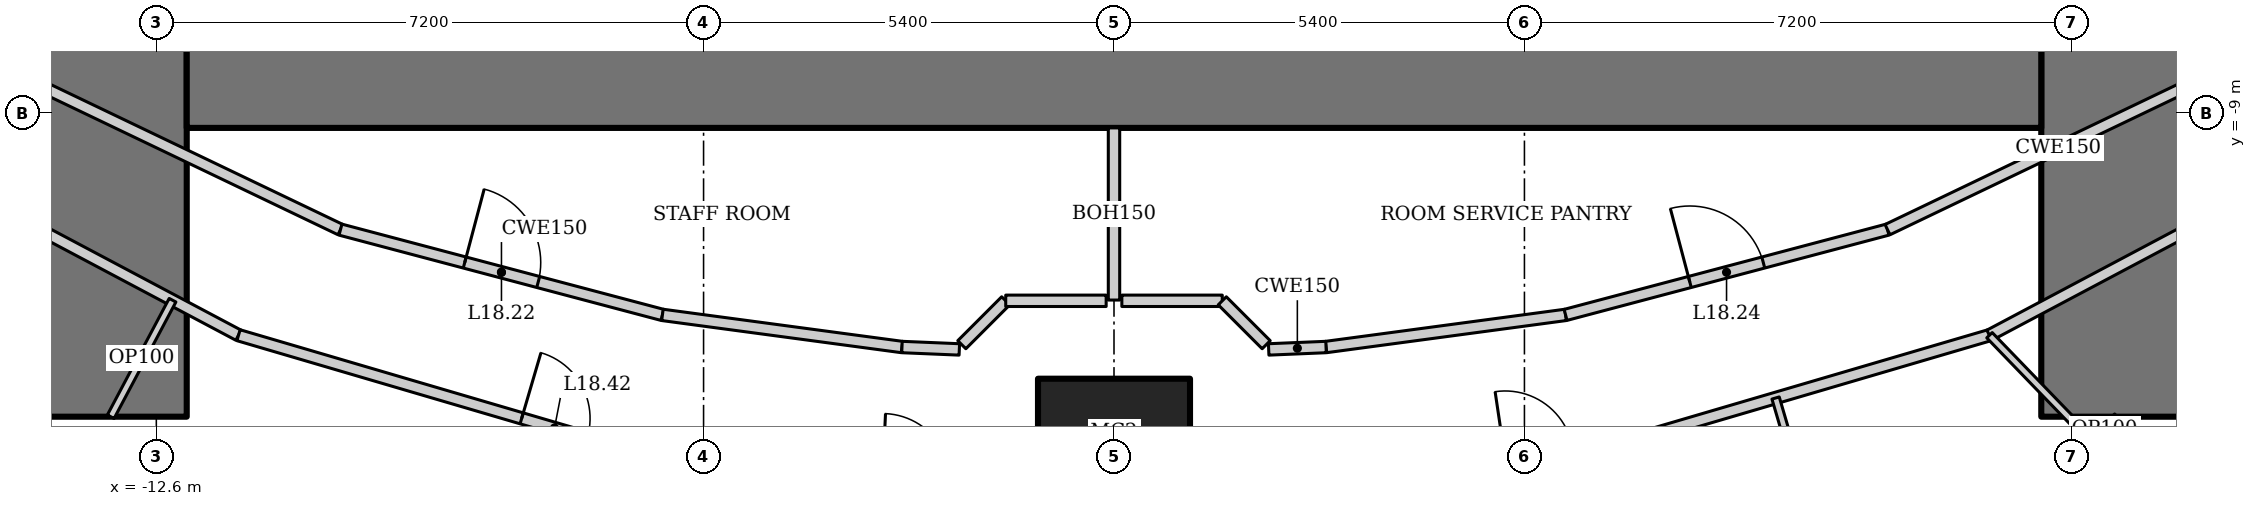
"""IFC4 building model, lengths in metres.
Left out: names, types, materials, properties, quantities, classifications, styles, units other than length and angle.
Written with IfcOpenShell. Run it as: python <this file> out.ifc"""

import sys

from ifc_helpers import new_model, si_unit, direction, frame, frame_2d, origin, origin_2d, place, context, subcontext, project, spatial, rectangle, hollow_rectangle, extrude, element, fill, save


model = new_model("IFC4")
c1 = context("Model", 3, precision=1e-05, world=origin(), true_north=direction((0.0, 1.0)))
c2 = subcontext(c1, "Body", "Model", "MODEL_VIEW")
j1 = project(units=[si_unit("LENGTHUNIT", "METRE"), si_unit("PLANEANGLEUNIT", "RADIAN")], contexts=[c1])
p1 = place(None, origin())
s1 = spatial("IfcSite", under=j1, at=p1, CompositionType="ELEMENT")
p2 = place(p1, origin())
s2 = spatial("IfcBuilding", under=s1, at=p2, CompositionType="ELEMENT")
p3 = place(p2, frame((0.0, 0.0, 80.2)))
s3 = spatial("IfcBuildingStorey", under=s2, at=p3, CompositionType="ELEMENT", Elevation=80.2)
p4 = place(p3, frame((0.0, -13.5, 0.0), z_axis=(0.0, 0.0, 1.0), x_axis=(1.0, 0.0, 0.0)))
e1 = element("IfcColumn", 1, at=p4, inside=s3, PredefinedType="COLUMN", context=c2, shape_type="SweptSolid", body=[
    extrude(hollow_rectangle(XDim=2.0, YDim=2.0, WallThickness=0.17, at=origin_2d()), origin(), (0.0, 0.0, 1.0), 3.6),
])
p5 = place(p3, frame((13.2, -13.0, 0.0), z_axis=(0.0, 0.0, 1.0), x_axis=(0.0, 1.0, 0.0)))
e2 = element("IfcWall", 2, at=p5, inside=s3, PredefinedType="SHEAR", context=c2, shape_type="SweptSolid", body=[
    extrude(rectangle(XDim=26.0, YDim=2.0, at=frame_2d((13.0, 0.0))), origin(), (0.0, 0.0, 1.0), 3.6),
])
p6 = place(p5, frame((12.1, 0.0, 0.0)))
e3 = element("IfcOpeningElement", 3, at=p6, cuts=e2, PredefinedType="OPENING", context=c2, shape_type="SweptSolid", body=[
    extrude(rectangle(XDim=1.8, YDim=2.1, at=frame_2d((0.9, 1.05))), frame((0.0, 1.01, 0.0), z_axis=(0.0, -1.0, 0.0), x_axis=(1.0, 0.0, 0.0)), (0.0, 0.0, 1.0), 2.02),
])
p7 = place(p3, frame((-13.2, 13.0, 0.0), z_axis=(0.0, 0.0, 1.0), x_axis=(0.0, -1.0, 0.0)))
e4 = element("IfcWall", 4, at=p7, inside=s3, PredefinedType="SHEAR", context=c2, shape_type="SweptSolid", body=[
    extrude(rectangle(XDim=26.0, YDim=2.0, at=frame_2d((13.0, 0.0))), origin(), (0.0, 0.0, 1.0), 3.6),
])
p8 = place(p7, frame((12.1, 0.0, 0.0)))
e5 = element("IfcOpeningElement", 5, at=p8, cuts=e4, PredefinedType="OPENING", context=c2, shape_type="SweptSolid", body=[
    extrude(rectangle(XDim=1.8, YDim=2.1, at=frame_2d((0.9, 1.05))), frame((0.0, 1.01, 0.0), z_axis=(0.0, -1.0, 0.0), x_axis=(1.0, 0.0, 0.0)), (0.0, 0.0, 1.0), 2.02),
])
p9 = place(p3, frame((-12.2, -8.0, 0.0), z_axis=(0.0, 0.0, 1.0), x_axis=(1.0, 0.0, 0.0)))
e6 = element("IfcWall", 6, at=p9, inside=s3, PredefinedType="SHEAR", context=c2, shape_type="SweptSolid", body=[
    extrude(rectangle(XDim=24.4, YDim=2.4, at=frame_2d((12.2, 0.0))), origin(), (0.0, 0.0, 1.0), 3.6),
])
p10 = place(p3, frame((-16.369, -9.354, 0.0), z_axis=(0.0, 0.0, 1.0), x_axis=(0.883334368785, -0.468743419071, 0.0)))
e7 = element("IfcWall", 7, at=p10, inside=s3, PredefinedType="PARTITIONING", context=c2, shape_type="SweptSolid", body=[
    extrude(rectangle(XDim=5.491, YDim=0.15, at=frame_2d((2.746, 0.0))), origin(), (0.0, 0.0, 1.0), 3.45),
])
p11 = place(p3, frame((-11.519, -11.928, 0.0), z_axis=(0.0, 0.0, 1.0), x_axis=(0.959496227294, -0.281721475589, 0.0)))
e8 = element("IfcWall", 8, at=p11, inside=s3, PredefinedType="PARTITIONING", context=c2, shape_type="SweptSolid", body=[
    extrude(rectangle(XDim=4.933, YDim=0.15, at=frame_2d((2.466, 0.0))), origin(), (0.0, 0.0, 1.0), 3.45),
])
p12 = place(p11, frame((3.883, 0.0, 0.0)))
e9 = element("IfcOpeningElement", 9, at=p12, cuts=e8, PredefinedType="OPENING", context=c2, shape_type="SweptSolid", body=[
    extrude(rectangle(XDim=0.9, YDim=2.1, at=frame_2d((0.45, 1.05))), frame((0.0, 0.085, 0.0), z_axis=(0.0, -1.0, 0.0), x_axis=(1.0, 0.0, 0.0)), (0.0, 0.0, 1.0), 0.17),
])
p13 = place(p3, frame((6.786, -13.317, 0.0), z_axis=(0.0, 0.0, 1.0), x_axis=(0.959496227294, 0.281721475589, 0.0)))
e10 = element("IfcWall", 10, at=p13, inside=s3, PredefinedType="PARTITIONING", context=c2, shape_type="SweptSolid", body=[
    extrude(rectangle(XDim=4.933, YDim=0.15, at=frame_2d((2.466, 0.0))), origin(), (0.0, 0.0, 1.0), 3.45),
])
p14 = place(p3, frame((11.519, -11.928, 0.0), z_axis=(0.0, 0.0, 1.0), x_axis=(0.883334368785, 0.468743419071, 0.0)))
e11 = element("IfcWall", 11, at=p14, inside=s3, PredefinedType="PARTITIONING", context=c2, shape_type="SweptSolid", body=[
    extrude(rectangle(XDim=5.491, YDim=0.15, at=frame_2d((2.746, 0.0))), origin(), (0.0, 0.0, 1.0), 3.45),
])
p15 = place(p3, frame((-14.673, -8.385, 0.0), z_axis=(0.0, 0.0, 1.0), x_axis=(0.901869692799, -0.43200816799, 0.0)))
e12 = element("IfcWall", 12, at=p15, inside=s3, PredefinedType="PARTITIONING", context=c2, shape_type="SweptSolid", body=[
    extrude(rectangle(XDim=4.986, YDim=0.15, at=frame_2d((2.493, 0.0))), origin(), (0.0, 0.0, 1.0), 3.45),
])
p16 = place(p3, frame((-10.177, -10.539, 0.0), z_axis=(0.0, 0.0, 1.0), x_axis=(0.966672790407, -0.256015070428, 0.0)))
e13 = element("IfcWall", 13, at=p16, inside=s3, PredefinedType="PARTITIONING", context=c2, shape_type="SweptSolid", body=[
    extrude(rectangle(XDim=4.382, YDim=0.15, at=frame_2d((2.191, 0.0))), origin(), (0.0, 0.0, 1.0), 3.45),
])
p17 = place(p16, frame((1.691, 0.0, 0.0)))
e14 = element("IfcOpeningElement", 14, at=p17, cuts=e13, PredefinedType="OPENING", context=c2, shape_type="SweptSolid", body=[
    extrude(rectangle(XDim=1.0, YDim=2.1, at=frame_2d((0.5, 1.05))), frame((0.0, 0.085, 0.0), z_axis=(0.0, -1.0, 0.0), x_axis=(1.0, 0.0, 0.0)), (0.0, 0.0, 1.0), 0.17),
])
for number, where, z_axis, x_axis in (
    (15, (-5.941, -11.66, 0.0), (0.0, 0.0, 1.0), (0.991, -0.133, 0.0)),
    (16, (2.79, -12.083, 0.0), (0.0, 0.0, 1.0), (0.991, 0.133, 0.0)),
):
    element("IfcWall", number, at=place(p3, frame(where, z_axis=z_axis, x_axis=x_axis)), inside=s3, PredefinedType="PARTITIONING", context=c2, shape_type="SweptSolid", body=[
        extrude(rectangle(XDim=3.18, YDim=0.15, at=frame_2d((1.59, 0.0))), origin(), (0.0, 0.0, 1.0), 3.45),
    ])
p18 = place(p3, frame((5.941, -11.66, 0.0), z_axis=(0.0, 0.0, 1.0), x_axis=(0.966672790407, 0.256015070428, 0.0)))
e17 = element("IfcWall", 17, at=p18, inside=s3, PredefinedType="PARTITIONING", context=c2, shape_type="SweptSolid", body=[
    extrude(rectangle(XDim=4.382, YDim=0.15, at=frame_2d((2.191, 0.0))), origin(), (0.0, 0.0, 1.0), 3.45),
])
p19 = place(p18, frame((1.691, 0.0, 0.0)))
e18 = element("IfcOpeningElement", 18, at=p19, cuts=e17, PredefinedType="OPENING", context=c2, shape_type="SweptSolid", body=[
    extrude(rectangle(XDim=1.0, YDim=2.1, at=frame_2d((0.5, 1.05))), frame((0.0, 0.085, 0.0), z_axis=(0.0, -1.0, 0.0), x_axis=(1.0, 0.0, 0.0)), (0.0, 0.0, 1.0), 0.17),
])
p20 = place(p3, frame((10.177, -10.539, 0.0), z_axis=(0.0, 0.0, 1.0), x_axis=(0.901869692799, 0.43200816799, 0.0)))
e19 = element("IfcWall", 19, at=p20, inside=s3, PredefinedType="PARTITIONING", context=c2, shape_type="SweptSolid", body=[
    extrude(rectangle(XDim=4.986, YDim=0.15, at=frame_2d((2.493, 0.0))), origin(), (0.0, 0.0, 1.0), 3.45),
])
p21 = place(p3, frame((8.705, -12.754, 0.0), z_axis=(0.0, 0.0, 1.0), x_axis=(0.281659633817, -0.959514382736, 0.0)))
e20 = element("IfcWall", 20, at=p21, inside=s3, PredefinedType="PARTITIONING", context=c2, shape_type="SweptSolid", body=[
    extrude(rectangle(XDim=2.4, YDim=0.1, at=frame_2d((1.2, 0.0))), origin(), (0.0, 0.0, 1.0), 3.45),
])
p22 = place(p21, frame((0.7, 0.0, 0.0)))
e21 = element("IfcOpeningElement", 21, at=p22, cuts=e20, PredefinedType="OPENING", context=c2, shape_type="SweptSolid", body=[
    extrude(rectangle(XDim=0.8, YDim=2.1, at=frame_2d((0.4, 1.05))), frame((0.0, 0.06, 0.0), z_axis=(0.0, -1.0, 0.0), x_axis=(1.0, 0.0, 0.0)), (0.0, 0.0, 1.0), 0.12),
])
p23 = place(p3, frame((16.944, -17.545, 0.0), z_axis=(0.0, 0.0, 1.0), x_axis=(-0.694666479492, 0.719331969448, 0.0)))
e22 = element("IfcWall", 22, at=p23, inside=s3, PredefinedType="PARTITIONING", context=c2, shape_type="SweptSolid", body=[
    extrude(rectangle(XDim=7.81, YDim=0.1, at=frame_2d((3.905, 0.0))), origin(), (0.0, 0.0, 1.0), 2.528),
])
p24 = place(p23, frame((3.455, 0.0, 0.0)))
e23 = element("IfcOpeningElement", 23, at=p24, cuts=e22, PredefinedType="OPENING", context=c2, shape_type="SweptSolid", body=[
    extrude(rectangle(XDim=0.9, YDim=2.1, at=frame_2d((0.45, 1.05))), frame((0.0, 0.06, 0.0), z_axis=(0.0, -1.0, 0.0), x_axis=(1.0, 0.0, 0.0)), (0.0, 0.0, 1.0), 0.12),
])
p25 = place(p3, frame((13.2, -13.0, 0.0), z_axis=(0.0, 0.0, 1.0), x_axis=(-0.719347134512, -0.69465077562, 0.0)))
e24 = element("IfcWall", 24, at=p25, inside=s3, PredefinedType="PARTITIONING", context=c2, shape_type="SweptSolid", body=[
    extrude(rectangle(XDim=0.465, YDim=0.1, at=frame_2d((0.232, 0.0))), origin(), (0.0, 0.0, 1.0), 3.45),
])
p26 = place(p3, frame((-13.2, -13.0, 0.0), z_axis=(0.0, 0.0, 1.0), x_axis=(0.46874717052, 0.88333237806, 0.0)))
e25 = element("IfcWall", 25, at=p26, inside=s3, PredefinedType="PARTITIONING", context=c2, shape_type="SweptSolid", body=[
    extrude(rectangle(XDim=1.735, YDim=0.1, at=frame_2d((0.868, 0.0))), origin(), (0.0, 0.0, 1.0), 3.45),
])
for number, where, z_axis, x_axis in (
    (26, (-2.79, -12.083, 0.0), (0.0, 0.0, 1.0), (0.999, -0.042, 0.0)),
    (27, (2.035, -12.115, 0.0), (0.0, 0.0, 1.0), (0.999, 0.042, 0.0)),
):
    element("IfcWall", number, at=place(p3, frame(where, z_axis=z_axis, x_axis=x_axis)), inside=s3, PredefinedType="PARTITIONING", context=c2, shape_type="SweptSolid", body=[
        extrude(rectangle(XDim=0.755, YDim=0.15, at=frame_2d((0.378, 0.0))), origin(), (0.0, 0.0, 1.0), 3.45),
    ])
p27 = place(p3, frame((0.0, -9.2, 0.0), z_axis=(0.0, 0.0, 1.0), x_axis=(0.0, -1.0, 0.0)))
e28 = element("IfcWall", 28, at=p27, inside=s3, PredefinedType="PARTITIONING", context=c2, shape_type="SweptSolid", body=[
    extrude(rectangle(XDim=2.265, YDim=0.15, at=frame_2d((1.133, 0.0))), origin(), (0.0, 0.0, 1.0), 3.044),
])
p28 = place(p3, frame((-2.002, -12.053, 0.0), z_axis=(0.0, 0.0, 1.0), x_axis=(0.707256164678, 0.706957366129, 0.0)))
e29 = element("IfcWall", 29, at=p28, inside=s3, PredefinedType="PARTITIONING", context=c2, shape_type="SweptSolid", body=[
    extrude(rectangle(XDim=0.817, YDim=0.15, at=frame_2d((0.409, 0.0))), origin(), (0.0, 0.0, 1.0), 3.45),
])
for number, where, z_axis, x_axis in (
    (30, (-1.425, -11.475, 0.0), (0.0, 0.0, 1.0), (1.0, 0.0, 0.0)),
    (31, (0.103, -11.475, 0.0), (0.0, 0.0, 1.0), (1.0, 0.0, 0.0)),
):
    element("IfcWall", number, at=place(p3, frame(where, z_axis=z_axis, x_axis=x_axis)), inside=s3, PredefinedType="PARTITIONING", context=c2, shape_type="SweptSolid", body=[
        extrude(rectangle(XDim=1.321, YDim=0.15, at=frame_2d((0.661, 0.0))), origin(), (0.0, 0.0, 1.0), 3.45),
    ])
p29 = place(p3, frame((1.425, -11.475, 0.0), z_axis=(0.0, 0.0, 1.0), x_axis=(0.707256164678, -0.706957366129, 0.0)))
e32 = element("IfcWall", 32, at=p29, inside=s3, PredefinedType="PARTITIONING", context=c2, shape_type="SweptSolid", body=[
    extrude(rectangle(XDim=0.817, YDim=0.15, at=frame_2d((0.409, 0.0))), origin(), (0.0, 0.0, 1.0), 3.45),
])
p30 = place(p17, origin())
e33 = element("IfcDoor", 33, at=p30, inside=s3, OperationType="SINGLE_SWING_LEFT", PredefinedType="DOOR", context=c2, shape_type="SweptSolid", body=[
    extrude(rectangle(XDim=1.0, YDim=2.1, at=frame_2d((0.5, 1.05))), frame((0.0, 0.025, 0.0), z_axis=(0.0, -1.0, 0.0), x_axis=(1.0, 0.0, 0.0)), (0.0, 0.0, 1.0), 0.05),
])
fill(e14, e33)
p31 = place(p19, origin())
e34 = element("IfcDoor", 34, at=p31, inside=s3, OperationType="SINGLE_SWING_LEFT", PredefinedType="DOOR", context=c2, shape_type="SweptSolid", body=[
    extrude(rectangle(XDim=1.0, YDim=2.1, at=frame_2d((0.5, 1.05))), frame((0.0, 0.025, 0.0), z_axis=(0.0, -1.0, 0.0), x_axis=(1.0, 0.0, 0.0)), (0.0, 0.0, 1.0), 0.05),
])
fill(e18, e34)
p32 = place(p12, origin())
e35 = element("IfcDoor", 35, at=p32, inside=s3, OperationType="SINGLE_SWING_LEFT", PredefinedType="DOOR", context=c2, shape_type="SweptSolid", body=[
    extrude(rectangle(XDim=0.9, YDim=2.1, at=frame_2d((0.45, 1.05))), frame((0.0, 0.025, 0.0), z_axis=(0.0, -1.0, 0.0), x_axis=(1.0, 0.0, 0.0)), (0.0, 0.0, 1.0), 0.05),
])
fill(e9, e35)
save(model, sys.argv[1])
